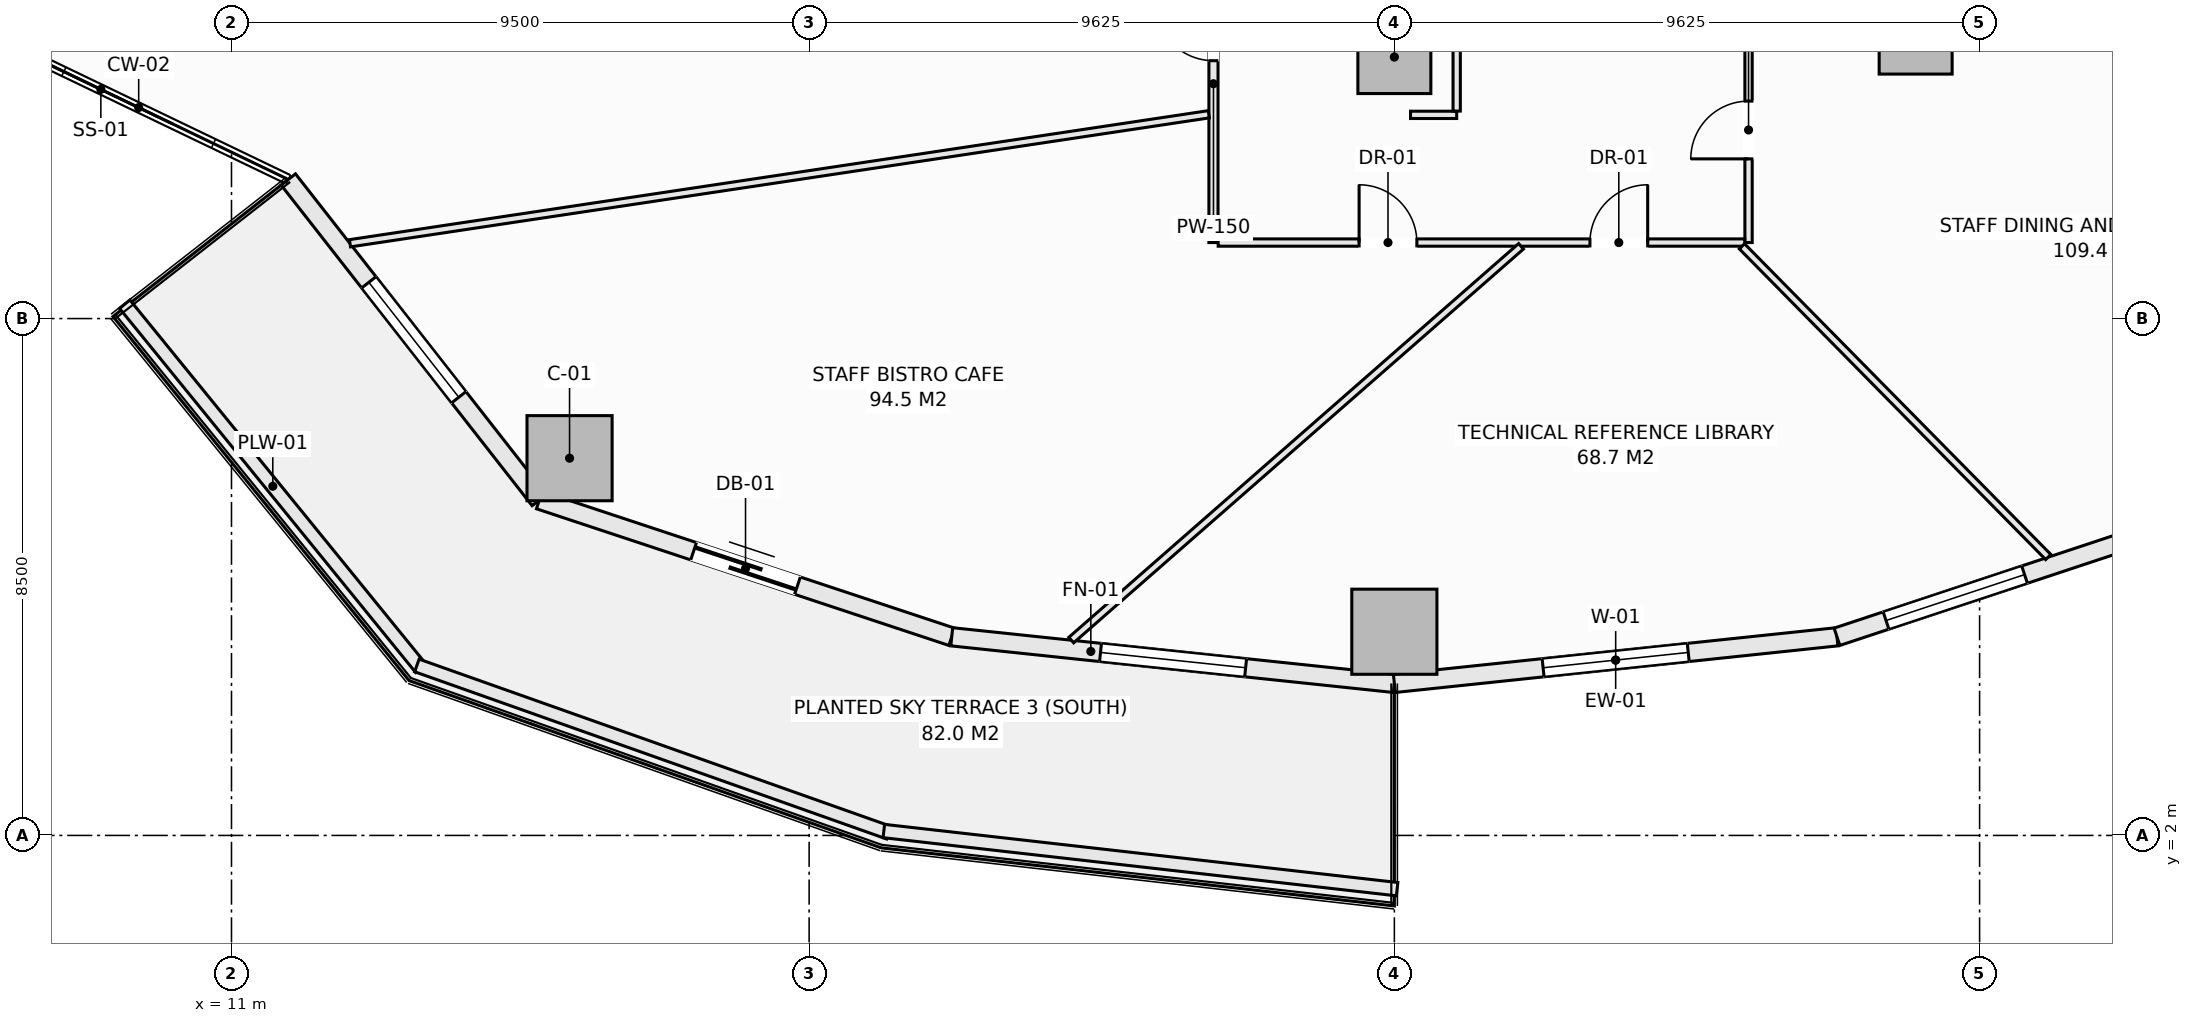
"""IFC4 building model, lengths in metres.
Left out: names, types, materials, properties, quantities, classifications, styles, units other than length and angle.
Written with IfcOpenShell. Run it as: python <this file> out.ifc"""

import sys

from ifc_helpers import new_model, si_unit, direction, frame, frame_2d, origin, origin_2d, place, context, subcontext, project, spatial, rectangle, extrude, element, fill, save


model = new_model("IFC4")
c1 = context("Model", 3, precision=1e-05, world=origin(), true_north=direction((0.0, 1.0)))
c2 = subcontext(c1, "Body", "Model", "MODEL_VIEW")
j1 = project(units=[si_unit("LENGTHUNIT", "METRE"), si_unit("PLANEANGLEUNIT", "RADIAN")], contexts=[c1])
p1 = place(None, origin())
s1 = spatial("IfcSite", under=j1, at=p1, CompositionType="ELEMENT")
p2 = place(p1, origin())
s2 = spatial("IfcBuilding", under=s1, at=p2, CompositionType="ELEMENT")
p3 = place(p2, frame((0.0, 0.0, 45.75)))
s3 = spatial("IfcBuildingStorey", under=s2, at=p3, CompositionType="ELEMENT", Elevation=45.75)
for number, where, z_axis, x_axis in (
    (1, (16.56, 8.204, -0.28), (0.0, 0.0, 1.0), (1.0, 0.0, 0.0)),
    (2, (30.125, 5.35, -0.28), (0.0, 0.0, 1.0), (1.0, 0.0, 0.0)),
):
    element("IfcColumn", number, at=place(p3, frame(where, z_axis=z_axis, x_axis=x_axis)), inside=s3, PredefinedType="COLUMN", context=c2, shape_type="SweptSolid", body=[
        extrude(rectangle(XDim=1.4, YDim=1.4, at=origin_2d()), origin(), (0.0, 0.0, 1.0), 3.85),
    ])
for number, where, z_axis, x_axis in (
    (3, (30.125, 14.8, -0.28), (0.0, 0.0, 1.0), (1.0, 0.0, 0.0)),
    (4, (38.698, 15.121, -0.28), (0.0, 0.0, 1.0), (1.0, 0.0, 0.0)),
):
    element("IfcColumn", number, at=place(p3, frame(where, z_axis=z_axis, x_axis=x_axis)), inside=s3, PredefinedType="COLUMN", context=c2, shape_type="SweptSolid", body=[
        extrude(rectangle(XDim=1.2, YDim=1.2, at=origin_2d()), origin(), (0.0, 0.0, 1.0), 3.85),
    ])
p4 = place(p3, frame((11.935, 12.787, 0.0), z_axis=(0.0, 0.0, 1.0), x_axis=(0.616421309777, -0.787416515482, 0.0)))
e5 = element("IfcWall", 5, at=p4, inside=s3, PredefinedType="SOLIDWALL", context=c2, shape_type="SweptSolid", body=[
    extrude(rectangle(XDim=6.696, YDim=0.3, at=frame_2d((3.348, 0.0))), origin(), (0.0, 0.0, 1.0), 3.093),
])
p5 = place(p4, frame((2.148, 0.0, 0.85)))
e6 = element("IfcOpeningElement", 6, at=p5, cuts=e5, PredefinedType="OPENING", context=c2, shape_type="SweptSolid", body=[
    extrude(rectangle(XDim=2.4, YDim=1.9, at=frame_2d((1.2, 0.95))), frame((0.0, 0.16, 0.0), z_axis=(0.0, -1.0, 0.0), x_axis=(1.0, 0.0, 0.0)), (0.0, 0.0, 1.0), 0.32),
])
p6 = place(p3, frame((16.062, 7.514, 0.0), z_axis=(0.0, 0.0, 1.0), x_axis=(0.949238715533, -0.31455661006, 0.0)))
e7 = element("IfcWall", 7, at=p6, inside=s3, PredefinedType="SOLIDWALL", context=c2, shape_type="SweptSolid", body=[
    extrude(rectangle(XDim=7.146, YDim=0.3, at=frame_2d((3.573, 0.0))), origin(), (0.0, 0.0, 1.0), 3.093),
])
p7 = place(p6, frame((2.673, 0.0, 0.0)))
e8 = element("IfcOpeningElement", 8, at=p7, cuts=e7, PredefinedType="OPENING", context=c2, shape_type="SweptSolid", body=[
    extrude(rectangle(XDim=1.8, YDim=2.25, at=frame_2d((0.9, 1.125))), frame((0.0, 0.16, 0.0), z_axis=(0.0, -1.0, 0.0), x_axis=(1.0, 0.0, 0.0)), (0.0, 0.0, 1.0), 0.32),
])
p8 = place(p3, frame((22.846, 5.267, 0.0), z_axis=(0.0, 0.0, 1.0), x_axis=(0.994500334317, -0.104733399844, 0.0)))
e9 = element("IfcWall", 9, at=p8, inside=s3, PredefinedType="SOLIDWALL", context=c2, shape_type="SweptSolid", body=[
    extrude(rectangle(XDim=7.32, YDim=0.3, at=frame_2d((3.66, 0.0))), origin(), (0.0, 0.0, 1.0), 3.093),
])
p9 = place(p8, frame((2.46, 0.0, 0.85)))
e10 = element("IfcOpeningElement", 10, at=p9, cuts=e9, PredefinedType="OPENING", context=c2, shape_type="SweptSolid", body=[
    extrude(rectangle(XDim=2.4, YDim=1.9, at=frame_2d((1.2, 0.95))), frame((0.0, 0.16, 0.0), z_axis=(0.0, -1.0, 0.0), x_axis=(1.0, 0.0, 0.0)), (0.0, 0.0, 1.0), 0.32),
])
p10 = place(p3, frame((30.125, 4.5, 0.0), z_axis=(0.0, 0.0, 1.0), x_axis=(0.994500334317, 0.104733399844, 0.0)))
e11 = element("IfcWall", 11, at=p10, inside=s3, PredefinedType="SOLIDWALL", context=c2, shape_type="SweptSolid", body=[
    extrude(rectangle(XDim=7.32, YDim=0.3, at=frame_2d((3.66, 0.0))), origin(), (0.0, 0.0, 1.0), 3.093),
])
p11 = place(p10, frame((2.46, 0.0, 0.85)))
e12 = element("IfcOpeningElement", 12, at=p11, cuts=e11, PredefinedType="OPENING", context=c2, shape_type="SweptSolid", body=[
    extrude(rectangle(XDim=2.4, YDim=1.9, at=frame_2d((1.2, 0.95))), frame((0.0, 0.16, 0.0), z_axis=(0.0, -1.0, 0.0), x_axis=(1.0, 0.0, 0.0)), (0.0, 0.0, 1.0), 0.32),
])
p12 = place(p3, frame((37.404, 5.267, 0.0), z_axis=(0.0, 0.0, 1.0), x_axis=(0.949238715533, 0.31455661006, 0.0)))
e13 = element("IfcWall", 13, at=p12, inside=s3, PredefinedType="SOLIDWALL", context=c2, shape_type="SweptSolid", body=[
    extrude(rectangle(XDim=7.146, YDim=0.3, at=frame_2d((3.573, 0.0))), origin(), (0.0, 0.0, 1.0), 3.093),
])
p13 = place(p12, frame((0.85, 0.0, 0.85)))
e14 = element("IfcOpeningElement", 14, at=p13, cuts=e13, PredefinedType="OPENING", context=c2, shape_type="SweptSolid", body=[
    extrude(rectangle(XDim=2.4, YDim=1.9, at=frame_2d((1.2, 0.95))), frame((0.0, 0.16, 0.0), z_axis=(0.0, -1.0, 0.0), x_axis=(1.0, 0.0, 0.0)), (0.0, 0.0, 1.0), 0.32),
])
p14 = place(p3, frame((9.244, 10.736, 0.0), z_axis=(0.0, 0.0, 1.0), x_axis=(0.630997450658, -0.775784903993, 0.0)))
e15 = element("IfcWall", 15, at=p14, inside=s3, PredefinedType="PARAPET", context=c2, shape_type="SweptSolid", body=[
    extrude(rectangle(XDim=7.718, YDim=0.22, at=frame_2d((3.859, 0.0))), origin(), (0.0, 0.0, 1.0), 0.52),
])
p15 = place(p3, frame((14.049, 4.795, 0.0), z_axis=(0.0, 0.0, 1.0), x_axis=(0.942581348797, -0.333976647237, 0.0)))
e16 = element("IfcWall", 16, at=p15, inside=s3, PredefinedType="PARAPET", context=c2, shape_type="SweptSolid", body=[
    extrude(rectangle(XDim=8.236, YDim=0.22, at=frame_2d((4.118, 0.0))), origin(), (0.0, 0.0, 1.0), 0.52),
])
p16 = place(p3, frame((21.729, 2.073, 0.0), z_axis=(0.0, 0.0, 1.0), x_axis=(0.993644541351, -0.112563428535, 0.0)))
e17 = element("IfcWall", 17, at=p16, inside=s3, PredefinedType="PARAPET", context=c2, shape_type="SweptSolid", body=[
    extrude(rectangle(XDim=8.496, YDim=0.22, at=frame_2d((4.248, 0.0))), origin(), (0.0, 0.0, 1.0), 0.52),
])
p17 = place(p3, frame((27.15, 11.75, 0.0), z_axis=(0.0, 0.0, 1.0), x_axis=(0.0, 1.0, 0.0)))
e18 = element("IfcWall", 18, at=p17, inside=s3, PredefinedType="PARTITIONING", context=c2, shape_type="SweptSolid", body=[
    extrude(rectangle(XDim=5.223, YDim=0.15, at=frame_2d((2.611, 0.0))), origin(), (0.0, 0.0, 1.0), 3.57),
])
p18 = place(p17, frame((2.991, 0.0, 0.0)))
e19 = element("IfcOpeningElement", 19, at=p18, cuts=e18, PredefinedType="OPENING", context=c2, shape_type="SweptSolid", body=[
    extrude(rectangle(XDim=0.95, YDim=2.1, at=frame_2d((0.475, 1.05))), frame((0.0, 0.085, 0.0), z_axis=(0.0, -1.0, 0.0), x_axis=(1.0, 0.0, 0.0)), (0.0, 0.0, 1.0), 0.17),
])
p19 = place(p3, frame((35.95, 11.75, 0.0), z_axis=(0.0, 0.0, 1.0), x_axis=(0.0, 1.0, 0.0)))
e20 = element("IfcWall", 20, at=p19, inside=s3, PredefinedType="PARTITIONING", context=c2, shape_type="SweptSolid", body=[
    extrude(rectangle(XDim=3.838, YDim=0.12, at=frame_2d((1.919, 0.0))), origin(), (0.0, 0.0, 1.0), 3.57),
])
p20 = place(p19, frame((1.376, 0.0, 0.0)))
e21 = element("IfcOpeningElement", 21, at=p20, cuts=e20, PredefinedType="OPENING", context=c2, shape_type="SweptSolid", body=[
    extrude(rectangle(XDim=0.95, YDim=2.1, at=frame_2d((0.475, 1.05))), frame((0.0, 0.07, 0.0), z_axis=(0.0, -1.0, 0.0), x_axis=(1.0, 0.0, 0.0)), (0.0, 0.0, 1.0), 0.14),
])
p21 = place(p3, frame((27.227, 11.75, 0.0), z_axis=(0.0, 0.0, 1.0), x_axis=(1.0, 0.0, 0.0)))
e22 = element("IfcWall", 22, at=p21, inside=s3, PredefinedType="PARTITIONING", context=c2, shape_type="SweptSolid", body=[
    extrude(rectangle(XDim=8.661, YDim=0.12, at=frame_2d((4.331, 0.0))), origin(), (0.0, 0.0, 1.0), 3.57),
])
p22 = place(p21, frame((2.318, 0.0, 0.0)))
e23 = element("IfcOpeningElement", 23, at=p22, cuts=e22, PredefinedType="OPENING", context=c2, shape_type="SweptSolid", body=[
    extrude(rectangle(XDim=0.95, YDim=2.1, at=frame_2d((0.475, 1.05))), frame((0.0, 0.07, 0.0), z_axis=(0.0, -1.0, 0.0), x_axis=(1.0, 0.0, 0.0)), (0.0, 0.0, 1.0), 0.14),
])
p23 = place(p21, frame((6.114, 0.0, 0.0)))
e24 = element("IfcOpeningElement", 24, at=p23, cuts=e22, PredefinedType="OPENING", context=c2, shape_type="SweptSolid", body=[
    extrude(rectangle(XDim=0.95, YDim=2.1, at=frame_2d((0.475, 1.05))), frame((0.0, 0.07, 0.0), z_axis=(0.0, -1.0, 0.0), x_axis=(1.0, 0.0, 0.0)), (0.0, 0.0, 1.0), 0.14),
])
p24 = place(p3, frame((30.391, 13.85, 0.0), z_axis=(0.0, 0.0, 1.0), x_axis=(1.0, 0.0, 0.0)))
e25 = element("IfcWall", 25, at=p24, inside=s3, PredefinedType="PARTITIONING", context=c2, shape_type="SweptSolid", body=[
    extrude(rectangle(XDim=0.759, YDim=0.12, at=frame_2d((0.379, 0.0))), origin(), (0.0, 0.0, 1.0), 3.57),
])
p25 = place(p3, frame((31.15, 13.912, 0.0), z_axis=(0.0, 0.0, 1.0), x_axis=(0.0, 1.0, 0.0)))
e26 = element("IfcWall", 26, at=p25, inside=s3, PredefinedType="PARTITIONING", context=c2, shape_type="SweptSolid", body=[
    extrude(rectangle(XDim=1.676, YDim=0.12, at=frame_2d((0.838, 0.0))), origin(), (0.0, 0.0, 1.0), 3.57),
])
p26 = place(p3, frame((12.949, 11.738, 0.0), z_axis=(0.0, 0.0, 1.0), x_axis=(0.988910760152, 0.148510970826, 0.0)))
e27 = element("IfcWall", 27, at=p26, inside=s3, PredefinedType="PARTITIONING", context=c2, shape_type="SweptSolid", body=[
    extrude(rectangle(XDim=14.282, YDim=0.12, at=frame_2d((7.141, 0.0))), origin(), (0.0, 0.0, 1.0), 3.57),
])
p27 = place(p3, frame((24.811, 5.213, 0.0), z_axis=(0.0, 0.0, 1.0), x_axis=(0.752447459414, 0.658652276107, 0.0)))
e28 = element("IfcWall", 28, at=p27, inside=s3, PredefinedType="PARTITIONING", context=c2, shape_type="SweptSolid", body=[
    extrude(rectangle(XDim=9.831, YDim=0.12, at=frame_2d((4.916, 0.0))), origin(), (0.0, 0.0, 1.0), 3.57),
])
p28 = place(p3, frame((35.841, 11.688, 0.0), z_axis=(0.0, 0.0, 1.0), x_axis=(0.702122050881, -0.712056616897, 0.0)))
e29 = element("IfcWall", 29, at=p28, inside=s3, PredefinedType="PARTITIONING", context=c2, shape_type="SweptSolid", body=[
    extrude(rectangle(XDim=7.176, YDim=0.12, at=frame_2d((3.588, 0.0))), origin(), (0.0, 0.0, 1.0), 3.57),
])
p29 = place(p5, origin())
e30 = element("IfcWindow", 30, at=p29, inside=s3, PartitioningType="SINGLE_PANEL", PredefinedType="WINDOW", context=c2, shape_type="SweptSolid", body=[
    extrude(rectangle(XDim=2.4, YDim=1.9, at=frame_2d((1.2, 0.95))), frame((0.0, 0.03, 0.0), z_axis=(0.0, -1.0, 0.0), x_axis=(1.0, 0.0, 0.0)), (0.0, 0.0, 1.0), 0.06),
])
fill(e6, e30)
p30 = place(p7, frame((1.8, 0.0, 0.0), z_axis=(0.0, 0.0, 1.0), x_axis=(-1.0, 0.0, 0.0)))
e31 = element("IfcDoor", 31, at=p30, inside=s3, OperationType="SLIDING_TO_LEFT", PredefinedType="DOOR", context=c2, shape_type="SweptSolid", body=[
    extrude(rectangle(XDim=1.8, YDim=2.25, at=frame_2d((0.9, 1.125))), frame((0.0, 0.025, 0.0), z_axis=(0.0, -1.0, 0.0), x_axis=(1.0, 0.0, 0.0)), (0.0, 0.0, 1.0), 0.05),
])
fill(e8, e31)
p31 = place(p9, origin())
e32 = element("IfcWindow", 32, at=p31, inside=s3, PartitioningType="SINGLE_PANEL", PredefinedType="WINDOW", context=c2, shape_type="SweptSolid", body=[
    extrude(rectangle(XDim=2.4, YDim=1.9, at=frame_2d((1.2, 0.95))), frame((0.0, 0.03, 0.0), z_axis=(0.0, -1.0, 0.0), x_axis=(1.0, 0.0, 0.0)), (0.0, 0.0, 1.0), 0.06),
])
fill(e10, e32)
p32 = place(p11, origin())
e33 = element("IfcWindow", 33, at=p32, inside=s3, PartitioningType="SINGLE_PANEL", PredefinedType="WINDOW", context=c2, shape_type="SweptSolid", body=[
    extrude(rectangle(XDim=2.4, YDim=1.9, at=frame_2d((1.2, 0.95))), frame((0.0, 0.03, 0.0), z_axis=(0.0, -1.0, 0.0), x_axis=(1.0, 0.0, 0.0)), (0.0, 0.0, 1.0), 0.06),
])
fill(e12, e33)
p33 = place(p13, origin())
e34 = element("IfcWindow", 34, at=p33, inside=s3, PartitioningType="SINGLE_PANEL", PredefinedType="WINDOW", context=c2, shape_type="SweptSolid", body=[
    extrude(rectangle(XDim=2.4, YDim=1.9, at=frame_2d((1.2, 0.95))), frame((0.0, 0.03, 0.0), z_axis=(0.0, -1.0, 0.0), x_axis=(1.0, 0.0, 0.0)), (0.0, 0.0, 1.0), 0.06),
])
fill(e14, e34)
p34 = place(p18, origin())
e35 = element("IfcDoor", 35, at=p34, inside=s3, OperationType="SINGLE_SWING_RIGHT", PredefinedType="DOOR", context=c2, shape_type="SweptSolid", body=[
    extrude(rectangle(XDim=0.95, YDim=2.1, at=frame_2d((0.475, 1.05))), frame((0.0, 0.025, 0.0), z_axis=(0.0, -1.0, 0.0), x_axis=(1.0, 0.0, 0.0)), (0.0, 0.0, 1.0), 0.05),
])
fill(e19, e35)
p35 = place(p22, origin())
e36 = element("IfcDoor", 36, at=p35, inside=s3, OperationType="SINGLE_SWING_LEFT", PredefinedType="DOOR", context=c2, shape_type="SweptSolid", body=[
    extrude(rectangle(XDim=0.95, YDim=2.1, at=frame_2d((0.475, 1.05))), frame((0.0, 0.025, 0.0), z_axis=(0.0, -1.0, 0.0), x_axis=(1.0, 0.0, 0.0)), (0.0, 0.0, 1.0), 0.05),
])
fill(e23, e36)
p36 = place(p23, origin())
e37 = element("IfcDoor", 37, at=p36, inside=s3, OperationType="SINGLE_SWING_RIGHT", PredefinedType="DOOR", context=c2, shape_type="SweptSolid", body=[
    extrude(rectangle(XDim=0.95, YDim=2.1, at=frame_2d((0.475, 1.05))), frame((0.0, 0.025, 0.0), z_axis=(0.0, -1.0, 0.0), x_axis=(1.0, 0.0, 0.0)), (0.0, 0.0, 1.0), 0.05),
])
fill(e24, e37)
p37 = place(p20, origin())
e38 = element("IfcDoor", 38, at=p37, inside=s3, OperationType="SINGLE_SWING_LEFT", PredefinedType="DOOR", context=c2, shape_type="SweptSolid", body=[
    extrude(rectangle(XDim=0.95, YDim=2.1, at=frame_2d((0.475, 1.05))), frame((0.0, 0.025, 0.0), z_axis=(0.0, -1.0, 0.0), x_axis=(1.0, 0.0, 0.0)), (0.0, 0.0, 1.0), 0.05),
])
fill(e21, e38)
save(model, sys.argv[1])
